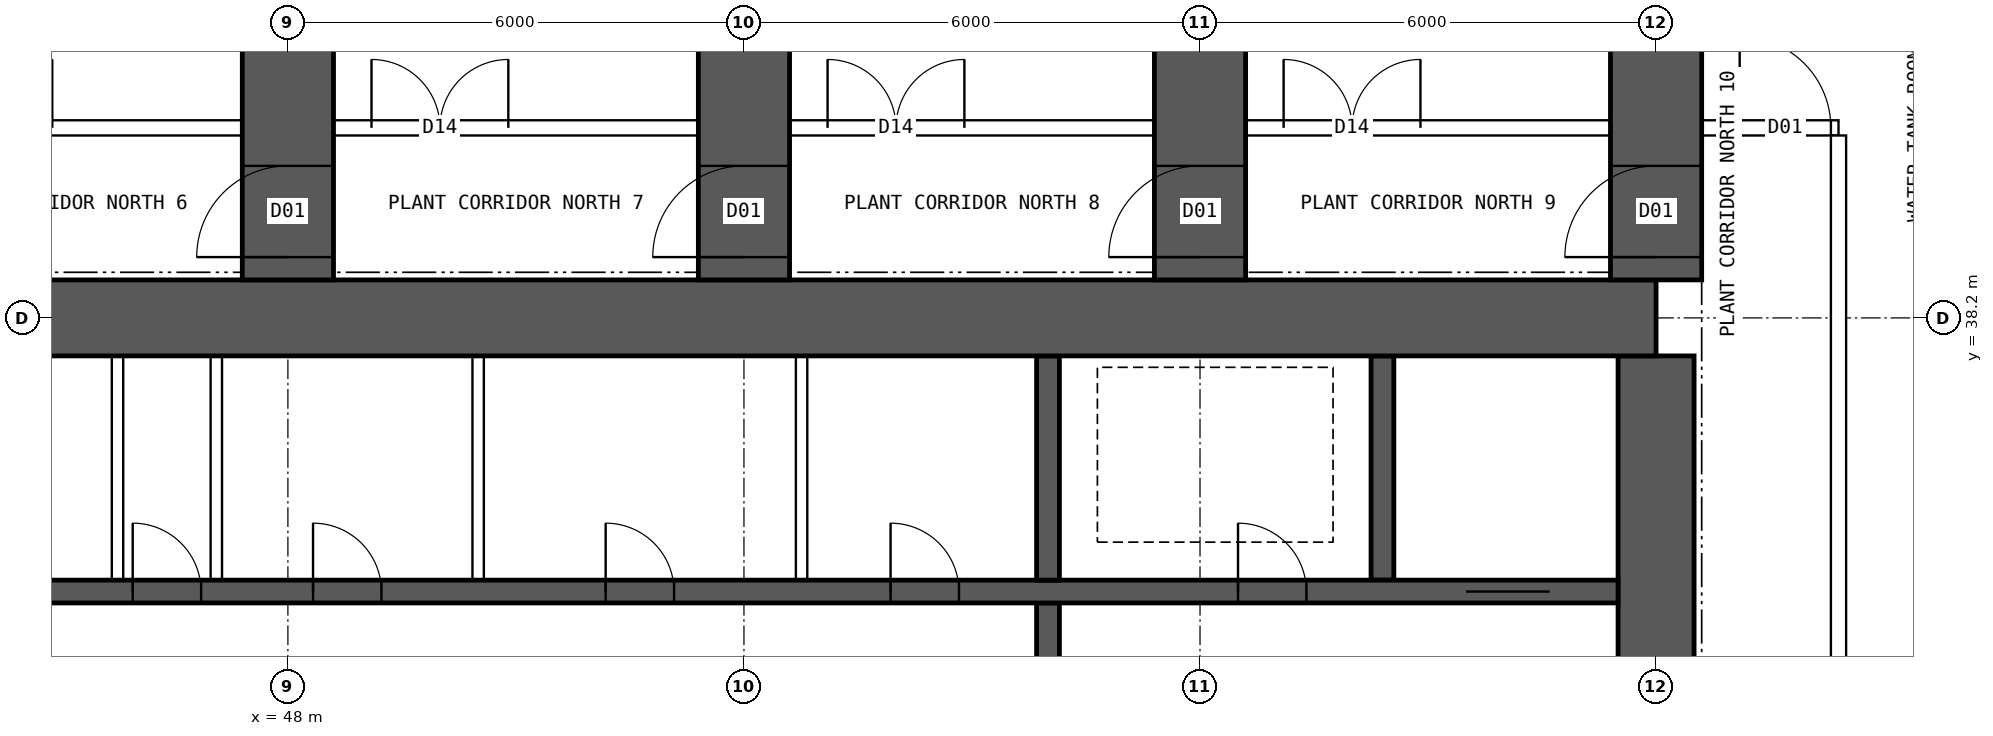
"""IFC4 building model, lengths in metres.
Left out: names, types, materials, properties, quantities, classifications, styles, units other than length and angle.
Written with IfcOpenShell. Run it as: python <this file> out.ifc"""

import sys

from ifc_helpers import new_model, si_unit, direction, frame, frame_2d, origin, place, context, subcontext, project, spatial, rectangle, extrude, element, fill, save


model = new_model("IFC4")
c1 = context("Model", 3, precision=1e-05, world=origin(), true_north=direction((0.0, 1.0)))
c2 = subcontext(c1, "Body", "Model", "MODEL_VIEW")
j1 = project(units=[si_unit("LENGTHUNIT", "METRE"), si_unit("PLANEANGLEUNIT", "RADIAN")], contexts=[c1])
p1 = place(None, origin())
s1 = spatial("IfcSite", under=j1, at=p1, CompositionType="ELEMENT")
p2 = place(p1, origin())
s2 = spatial("IfcBuilding", under=s1, at=p2, CompositionType="ELEMENT")
p3 = place(p2, frame((0.0, 0.0, 68.95)))
s3 = spatial("IfcBuildingStorey", under=s2, at=p3, CompositionType="ELEMENT", Elevation=68.95)
p4 = place(p3, frame((18.0, 38.2, 0.0), z_axis=(0.0, 0.0, 1.0), x_axis=(1.0, 0.0, 0.0)))
e1 = element("IfcWall", 1, at=p4, inside=s3, PredefinedType="SHEAR", context=c2, shape_type="SweptSolid", body=[
    extrude(rectangle(XDim=48.0, YDim=1.0, at=frame_2d((24.0, 0.0))), origin(), (0.0, 0.0, 1.0), 7.2),
])
p5 = place(p3, frame((66.0, 26.3, 0.0), z_axis=(0.0, 0.0, 1.0), x_axis=(0.0, 1.0, 0.0)))
e2 = element("IfcWall", 2, at=p5, inside=s3, PredefinedType="SHEAR", context=c2, shape_type="SweptSolid", body=[
    extrude(rectangle(XDim=11.4, YDim=1.0, at=frame_2d((5.7, 0.0))), origin(), (0.0, 0.0, 1.0), 7.2),
])
p6 = place(p5, frame((5.0, 0.0, 0.0)))
e3 = element("IfcOpeningElement", 3, at=p6, cuts=e2, PredefinedType="OPENING", context=c2, shape_type="SweptSolid", body=[
    extrude(rectangle(XDim=1.2, YDim=2.1, at=frame_2d((0.6, 1.05))), frame((0.0, 0.51, 0.0), z_axis=(0.0, -1.0, 0.0), x_axis=(1.0, 0.0, 0.0)), (0.0, 0.0, 1.0), 1.02),
])
p7 = place(p3, frame((18.5, 34.6, 0.0), z_axis=(0.0, 0.0, 1.0), x_axis=(1.0, 0.0, 0.0)))
e4 = element("IfcWall", 4, at=p7, inside=s3, PredefinedType="SHEAR", context=c2, shape_type="SweptSolid", body=[
    extrude(rectangle(XDim=47.0, YDim=0.3, at=frame_2d((23.5, 0.0))), origin(), (0.0, 0.0, 1.0), 7.2),
])
p8 = place(p7, frame((0.9, 0.0, 0.0)))
e5 = element("IfcOpeningElement", 5, at=p8, cuts=e4, PredefinedType="OPENING", context=c2, shape_type="SweptSolid", body=[
    extrude(rectangle(XDim=1.1, YDim=2.1, at=frame_2d((0.55, 1.05))), frame((0.0, 0.16, 0.0), z_axis=(0.0, -1.0, 0.0), x_axis=(1.0, 0.0, 0.0)), (0.0, 0.0, 1.0), 0.32),
])
p9 = place(p7, frame((45.0, 0.0, 0.0)))
e6 = element("IfcOpeningElement", 6, at=p9, cuts=e4, PredefinedType="OPENING", context=c2, shape_type="SweptSolid", body=[
    extrude(rectangle(XDim=1.1, YDim=2.1, at=frame_2d((0.55, 1.05))), frame((0.0, 0.16, 0.0), z_axis=(0.0, -1.0, 0.0), x_axis=(1.0, 0.0, 0.0)), (0.0, 0.0, 1.0), 0.32),
])
p10 = place(p7, frame((4.1, 0.0, 0.0)))
e7 = element("IfcOpeningElement", 7, at=p10, cuts=e4, PredefinedType="OPENING", context=c2, shape_type="SweptSolid", body=[
    extrude(rectangle(XDim=0.9, YDim=2.1, at=frame_2d((0.45, 1.05))), frame((0.0, 0.16, 0.0), z_axis=(0.0, -1.0, 0.0), x_axis=(1.0, 0.0, 0.0)), (0.0, 0.0, 1.0), 0.32),
])
p11 = place(p7, frame((42.0, 0.0, 0.0)))
e8 = element("IfcOpeningElement", 8, at=p11, cuts=e4, PredefinedType="OPENING", context=c2, shape_type="SweptSolid", body=[
    extrude(rectangle(XDim=0.9, YDim=2.1, at=frame_2d((0.45, 1.05))), frame((0.0, 0.16, 0.0), z_axis=(0.0, -1.0, 0.0), x_axis=(1.0, 0.0, 0.0)), (0.0, 0.0, 1.0), 0.32),
])
p12 = place(p7, frame((8.875, 0.0, 0.0)))
e9 = element("IfcOpeningElement", 9, at=p12, cuts=e4, PredefinedType="OPENING", context=c2, shape_type="SweptSolid", body=[
    extrude(rectangle(XDim=0.9, YDim=2.1, at=frame_2d((0.45, 1.05))), frame((0.0, 0.16, 0.0), z_axis=(0.0, -1.0, 0.0), x_axis=(1.0, 0.0, 0.0)), (0.0, 0.0, 1.0), 0.32),
])
p13 = place(p7, frame((12.849, 0.0, 0.0)))
e10 = element("IfcOpeningElement", 10, at=p13, cuts=e4, PredefinedType="OPENING", context=c2, shape_type="SweptSolid", body=[
    extrude(rectangle(XDim=0.9, YDim=2.1, at=frame_2d((0.45, 1.05))), frame((0.0, 0.16, 0.0), z_axis=(0.0, -1.0, 0.0), x_axis=(1.0, 0.0, 0.0)), (0.0, 0.0, 1.0), 0.32),
])
p14 = place(p7, frame((16.496, 0.0, 0.0)))
e11 = element("IfcOpeningElement", 11, at=p14, cuts=e4, PredefinedType="OPENING", context=c2, shape_type="SweptSolid", body=[
    extrude(rectangle(XDim=0.9, YDim=2.1, at=frame_2d((0.45, 1.05))), frame((0.0, 0.16, 0.0), z_axis=(0.0, -1.0, 0.0), x_axis=(1.0, 0.0, 0.0)), (0.0, 0.0, 1.0), 0.32),
])
p15 = place(p7, frame((20.255, 0.0, 0.0)))
e12 = element("IfcOpeningElement", 12, at=p15, cuts=e4, PredefinedType="OPENING", context=c2, shape_type="SweptSolid", body=[
    extrude(rectangle(XDim=0.9, YDim=2.1, at=frame_2d((0.45, 1.05))), frame((0.0, 0.16, 0.0), z_axis=(0.0, -1.0, 0.0), x_axis=(1.0, 0.0, 0.0)), (0.0, 0.0, 1.0), 0.32),
])
p16 = place(p7, frame((24.661, 0.0, 0.0)))
e13 = element("IfcOpeningElement", 13, at=p16, cuts=e4, PredefinedType="OPENING", context=c2, shape_type="SweptSolid", body=[
    extrude(rectangle(XDim=0.9, YDim=2.1, at=frame_2d((0.45, 1.05))), frame((0.0, 0.16, 0.0), z_axis=(0.0, -1.0, 0.0), x_axis=(1.0, 0.0, 0.0)), (0.0, 0.0, 1.0), 0.32),
])
p17 = place(p7, frame((27.458, 0.0, 0.0)))
e14 = element("IfcOpeningElement", 14, at=p17, cuts=e4, PredefinedType="OPENING", context=c2, shape_type="SweptSolid", body=[
    extrude(rectangle(XDim=0.9, YDim=2.1, at=frame_2d((0.45, 1.05))), frame((0.0, 0.16, 0.0), z_axis=(0.0, -1.0, 0.0), x_axis=(1.0, 0.0, 0.0)), (0.0, 0.0, 1.0), 0.32),
])
p18 = place(p7, frame((29.831, 0.0, 0.0)))
e15 = element("IfcOpeningElement", 15, at=p18, cuts=e4, PredefinedType="OPENING", context=c2, shape_type="SweptSolid", body=[
    extrude(rectangle(XDim=0.9, YDim=2.1, at=frame_2d((0.45, 1.05))), frame((0.0, 0.16, 0.0), z_axis=(0.0, -1.0, 0.0), x_axis=(1.0, 0.0, 0.0)), (0.0, 0.0, 1.0), 0.32),
])
p19 = place(p7, frame((33.68, 0.0, 0.0)))
e16 = element("IfcOpeningElement", 16, at=p19, cuts=e4, PredefinedType="OPENING", context=c2, shape_type="SweptSolid", body=[
    extrude(rectangle(XDim=0.9, YDim=2.1, at=frame_2d((0.45, 1.05))), frame((0.0, 0.16, 0.0), z_axis=(0.0, -1.0, 0.0), x_axis=(1.0, 0.0, 0.0)), (0.0, 0.0, 1.0), 0.32),
])
p20 = place(p7, frame((37.429, 0.0, 0.0)))
e17 = element("IfcOpeningElement", 17, at=p20, cuts=e4, PredefinedType="OPENING", context=c2, shape_type="SweptSolid", body=[
    extrude(rectangle(XDim=0.9, YDim=2.1, at=frame_2d((0.45, 1.05))), frame((0.0, 0.16, 0.0), z_axis=(0.0, -1.0, 0.0), x_axis=(1.0, 0.0, 0.0)), (0.0, 0.0, 1.0), 0.32),
])
p21 = place(p3, frame((58.0, 30.55, 0.0), z_axis=(0.0, 0.0, 1.0), x_axis=(0.0, 1.0, 0.0)))
e18 = element("IfcWall", 18, at=p21, inside=s3, PredefinedType="SHEAR", context=c2, shape_type="SweptSolid", body=[
    extrude(rectangle(XDim=3.9, YDim=0.3, at=frame_2d((1.95, 0.0))), origin(), (0.0, 0.0, 1.0), 7.2),
])
p22 = place(p21, frame((1.4, 0.0, 0.0)))
e19 = element("IfcOpeningElement", 19, at=p22, cuts=e18, PredefinedType="OPENING", context=c2, shape_type="SweptSolid", body=[
    extrude(rectangle(XDim=1.2, YDim=2.1, at=frame_2d((0.6, 1.05))), frame((0.0, 0.16, 0.0), z_axis=(0.0, -1.0, 0.0), x_axis=(1.0, 0.0, 0.0)), (0.0, 0.0, 1.0), 0.32),
])
for number, where, z_axis, x_axis in (
    (20, (62.4, 34.75, 0.0), (0.0, 0.0, 1.0), (0.0, 1.0, 0.0)),
    (21, (58.0, 34.75, 0.0), (0.0, 0.0, 1.0), (0.0, 1.0, 0.0)),
):
    element("IfcWall", number, at=place(p3, frame(where, z_axis=z_axis, x_axis=x_axis)), inside=s3, PredefinedType="SHEAR", context=c2, shape_type="SweptSolid", body=[
        extrude(rectangle(XDim=2.95, YDim=0.3, at=frame_2d((1.475, 0.0))), origin(), (0.0, 0.0, 1.0), 7.2),
    ])
p23 = place(p3, frame((48.0, 38.7, 0.0), z_axis=(0.0, 0.0, 1.0), x_axis=(0.0, 1.0, 0.0)))
e22 = element("IfcWall", 22, at=p23, inside=s3, PredefinedType="SHEAR", context=c2, shape_type="SweptSolid", body=[
    extrude(rectangle(XDim=17.6, YDim=1.2, at=frame_2d((8.8, 0.0))), origin(), (0.0, 0.0, 1.0), 7.2),
])
p24 = place(p23, frame((0.3, 0.0, 0.0)))
e23 = element("IfcOpeningElement", 23, at=p24, cuts=e22, PredefinedType="OPENING", context=c2, shape_type="SweptSolid", body=[
    extrude(rectangle(XDim=1.2, YDim=2.1, at=frame_2d((0.6, 1.05))), frame((0.0, 0.61, 0.0), z_axis=(0.0, -1.0, 0.0), x_axis=(1.0, 0.0, 0.0)), (0.0, 0.0, 1.0), 1.22),
])
p25 = place(p3, frame((54.0, 38.7, 0.0), z_axis=(0.0, 0.0, 1.0), x_axis=(0.0, 1.0, 0.0)))
e24 = element("IfcWall", 24, at=p25, inside=s3, PredefinedType="SHEAR", context=c2, shape_type="SweptSolid", body=[
    extrude(rectangle(XDim=17.6, YDim=1.2, at=frame_2d((8.8, 0.0))), origin(), (0.0, 0.0, 1.0), 7.2),
])
p26 = place(p25, frame((0.3, 0.0, 0.0)))
e25 = element("IfcOpeningElement", 25, at=p26, cuts=e24, PredefinedType="OPENING", context=c2, shape_type="SweptSolid", body=[
    extrude(rectangle(XDim=1.2, YDim=2.1, at=frame_2d((0.6, 1.05))), frame((0.0, 0.61, 0.0), z_axis=(0.0, -1.0, 0.0), x_axis=(1.0, 0.0, 0.0)), (0.0, 0.0, 1.0), 1.22),
])
p27 = place(p3, frame((60.0, 38.7, 0.0), z_axis=(0.0, 0.0, 1.0), x_axis=(0.0, 1.0, 0.0)))
e26 = element("IfcWall", 26, at=p27, inside=s3, PredefinedType="SHEAR", context=c2, shape_type="SweptSolid", body=[
    extrude(rectangle(XDim=17.6, YDim=1.2, at=frame_2d((8.8, 0.0))), origin(), (0.0, 0.0, 1.0), 7.2),
])
p28 = place(p27, frame((0.3, 0.0, 0.0)))
e27 = element("IfcOpeningElement", 27, at=p28, cuts=e26, PredefinedType="OPENING", context=c2, shape_type="SweptSolid", body=[
    extrude(rectangle(XDim=1.2, YDim=2.1, at=frame_2d((0.6, 1.05))), frame((0.0, 0.61, 0.0), z_axis=(0.0, -1.0, 0.0), x_axis=(1.0, 0.0, 0.0)), (0.0, 0.0, 1.0), 1.22),
])
p29 = place(p3, frame((66.0, 38.7, 0.0), z_axis=(0.0, 0.0, 1.0), x_axis=(0.0, 1.0, 0.0)))
e28 = element("IfcWall", 28, at=p29, inside=s3, PredefinedType="SHEAR", context=c2, shape_type="SweptSolid", body=[
    extrude(rectangle(XDim=17.6, YDim=1.2, at=frame_2d((8.8, 0.0))), origin(), (0.0, 0.0, 1.0), 7.2),
])
p30 = place(p29, frame((0.3, 0.0, 0.0)))
e29 = element("IfcOpeningElement", 29, at=p30, cuts=e28, PredefinedType="OPENING", context=c2, shape_type="SweptSolid", body=[
    extrude(rectangle(XDim=1.2, YDim=2.1, at=frame_2d((0.6, 1.05))), frame((0.0, 0.61, 0.0), z_axis=(0.0, -1.0, 0.0), x_axis=(1.0, 0.0, 0.0)), (0.0, 0.0, 1.0), 1.22),
])
for number, where, z_axis, x_axis in (
    (30, (45.758, 34.75, 0.0), (0.0, 0.0, 1.0), (0.0, 1.0, 0.0)),
    (31, (47.058, 34.75, 0.0), (0.0, 0.0, 1.0), (0.0, 1.0, 0.0)),
    (32, (50.503, 34.75, 0.0), (0.0, 0.0, 1.0), (0.0, 1.0, 0.0)),
    (33, (54.758, 34.75, 0.0), (0.0, 0.0, 1.0), (0.0, 1.0, 0.0)),
):
    element("IfcWall", number, at=place(p3, frame(where, z_axis=z_axis, x_axis=x_axis)), inside=s3, PredefinedType="SOLIDWALL", context=c2, shape_type="SweptSolid", body=[
        extrude(rectangle(XDim=2.95, YDim=0.15, at=frame_2d((1.475, 0.0))), origin(), (0.0, 0.0, 1.0), 6.9),
    ])
p31 = place(p3, frame((15.6, 40.7, 0.0), z_axis=(0.0, 0.0, 1.0), x_axis=(1.0, 0.0, 0.0)))
e34 = element("IfcWall", 34, at=p31, inside=s3, PredefinedType="SOLIDWALL", context=c2, shape_type="SweptSolid", body=[
    extrude(rectangle(XDim=52.8, YDim=0.2, at=frame_2d((26.4, 0.0))), origin(), (0.0, 0.0, 1.0), 6.9),
])
p32 = place(p31, frame((0.6, 0.0, 0.0)))
e35 = element("IfcOpeningElement", 35, at=p32, cuts=e34, PredefinedType="OPENING", context=c2, shape_type="SweptSolid", body=[
    extrude(rectangle(XDim=1.2, YDim=2.1, at=frame_2d((0.6, 1.05))), frame((0.0, 0.11, 0.0), z_axis=(0.0, -1.0, 0.0), x_axis=(1.0, 0.0, 0.0)), (0.0, 0.0, 1.0), 0.22),
])
p33 = place(p31, frame((3.5, 0.0, 0.0)))
e36 = element("IfcOpeningElement", 36, at=p33, cuts=e34, PredefinedType="OPENING", context=c2, shape_type="SweptSolid", body=[
    extrude(rectangle(XDim=1.8, YDim=2.4, at=frame_2d((0.9, 1.2))), frame((0.0, 0.11, 0.0), z_axis=(0.0, -1.0, 0.0), x_axis=(1.0, 0.0, 0.0)), (0.0, 0.0, 1.0), 0.22),
])
p34 = place(p31, frame((9.5, 0.0, 0.0)))
e37 = element("IfcOpeningElement", 37, at=p34, cuts=e34, PredefinedType="OPENING", context=c2, shape_type="SweptSolid", body=[
    extrude(rectangle(XDim=1.8, YDim=2.4, at=frame_2d((0.9, 1.2))), frame((0.0, 0.11, 0.0), z_axis=(0.0, -1.0, 0.0), x_axis=(1.0, 0.0, 0.0)), (0.0, 0.0, 1.0), 0.22),
])
p35 = place(p31, frame((15.5, 0.0, 0.0)))
e38 = element("IfcOpeningElement", 38, at=p35, cuts=e34, PredefinedType="OPENING", context=c2, shape_type="SweptSolid", body=[
    extrude(rectangle(XDim=1.8, YDim=2.4, at=frame_2d((0.9, 1.2))), frame((0.0, 0.11, 0.0), z_axis=(0.0, -1.0, 0.0), x_axis=(1.0, 0.0, 0.0)), (0.0, 0.0, 1.0), 0.22),
])
p36 = place(p31, frame((21.5, 0.0, 0.0)))
e39 = element("IfcOpeningElement", 39, at=p36, cuts=e34, PredefinedType="OPENING", context=c2, shape_type="SweptSolid", body=[
    extrude(rectangle(XDim=1.8, YDim=2.4, at=frame_2d((0.9, 1.2))), frame((0.0, 0.11, 0.0), z_axis=(0.0, -1.0, 0.0), x_axis=(1.0, 0.0, 0.0)), (0.0, 0.0, 1.0), 0.22),
])
p37 = place(p31, frame((27.5, 0.0, 0.0)))
e40 = element("IfcOpeningElement", 40, at=p37, cuts=e34, PredefinedType="OPENING", context=c2, shape_type="SweptSolid", body=[
    extrude(rectangle(XDim=1.8, YDim=2.4, at=frame_2d((0.9, 1.2))), frame((0.0, 0.11, 0.0), z_axis=(0.0, -1.0, 0.0), x_axis=(1.0, 0.0, 0.0)), (0.0, 0.0, 1.0), 0.22),
])
p38 = place(p31, frame((33.5, 0.0, 0.0)))
e41 = element("IfcOpeningElement", 41, at=p38, cuts=e34, PredefinedType="OPENING", context=c2, shape_type="SweptSolid", body=[
    extrude(rectangle(XDim=1.8, YDim=2.4, at=frame_2d((0.9, 1.2))), frame((0.0, 0.11, 0.0), z_axis=(0.0, -1.0, 0.0), x_axis=(1.0, 0.0, 0.0)), (0.0, 0.0, 1.0), 0.22),
])
p39 = place(p31, frame((39.5, 0.0, 0.0)))
e42 = element("IfcOpeningElement", 42, at=p39, cuts=e34, PredefinedType="OPENING", context=c2, shape_type="SweptSolid", body=[
    extrude(rectangle(XDim=1.8, YDim=2.4, at=frame_2d((0.9, 1.2))), frame((0.0, 0.11, 0.0), z_axis=(0.0, -1.0, 0.0), x_axis=(1.0, 0.0, 0.0)), (0.0, 0.0, 1.0), 0.22),
])
p40 = place(p31, frame((45.5, 0.0, 0.0)))
e43 = element("IfcOpeningElement", 43, at=p40, cuts=e34, PredefinedType="OPENING", context=c2, shape_type="SweptSolid", body=[
    extrude(rectangle(XDim=1.8, YDim=2.4, at=frame_2d((0.9, 1.2))), frame((0.0, 0.11, 0.0), z_axis=(0.0, -1.0, 0.0), x_axis=(1.0, 0.0, 0.0)), (0.0, 0.0, 1.0), 0.22),
])
p41 = place(p31, frame((51.5, 0.0, 0.0)))
e44 = element("IfcOpeningElement", 44, at=p41, cuts=e34, PredefinedType="OPENING", context=c2, shape_type="SweptSolid", body=[
    extrude(rectangle(XDim=1.2, YDim=2.1, at=frame_2d((0.6, 1.05))), frame((0.0, 0.11, 0.0), z_axis=(0.0, -1.0, 0.0), x_axis=(1.0, 0.0, 0.0)), (0.0, 0.0, 1.0), 0.22),
])
p42 = place(p3, frame((68.4, 23.4, 0.0), z_axis=(0.0, 0.0, 1.0), x_axis=(0.0, 1.0, 0.0)))
e45 = element("IfcWall", 45, at=p42, inside=s3, PredefinedType="SOLIDWALL", context=c2, shape_type="SweptSolid", body=[
    extrude(rectangle(XDim=17.2, YDim=0.2, at=frame_2d((8.6, 0.0))), origin(), (0.0, 0.0, 1.0), 6.9),
])
p43 = place(p9, origin())
e46 = element("IfcDoor", 46, at=p43, inside=s3, OperationType="DOUBLE_DOOR_SLIDING", PredefinedType="DOOR", context=c2, shape_type="SweptSolid", body=[
    extrude(rectangle(XDim=1.1, YDim=2.1, at=frame_2d((0.55, 1.05))), frame((0.0, 0.025, 0.0), z_axis=(0.0, -1.0, 0.0), x_axis=(1.0, 0.0, 0.0)), (0.0, 0.0, 1.0), 0.05),
])
fill(e6, e46)
p44 = place(p11, origin())
e47 = element("IfcDoor", 47, at=p44, inside=s3, OperationType="SINGLE_SWING_LEFT", PredefinedType="DOOR", context=c2, shape_type="SweptSolid", body=[
    extrude(rectangle(XDim=0.9, YDim=2.1, at=frame_2d((0.45, 1.05))), frame((0.0, 0.025, 0.0), z_axis=(0.0, -1.0, 0.0), x_axis=(1.0, 0.0, 0.0)), (0.0, 0.0, 1.0), 0.05),
])
fill(e8, e47)
p45 = place(p17, origin())
e48 = element("IfcDoor", 48, at=p45, inside=s3, OperationType="SINGLE_SWING_LEFT", PredefinedType="DOOR", context=c2, shape_type="SweptSolid", body=[
    extrude(rectangle(XDim=0.9, YDim=2.1, at=frame_2d((0.45, 1.05))), frame((0.0, 0.025, 0.0), z_axis=(0.0, -1.0, 0.0), x_axis=(1.0, 0.0, 0.0)), (0.0, 0.0, 1.0), 0.05),
])
fill(e14, e48)
p46 = place(p18, origin())
e49 = element("IfcDoor", 49, at=p46, inside=s3, OperationType="SINGLE_SWING_LEFT", PredefinedType="DOOR", context=c2, shape_type="SweptSolid", body=[
    extrude(rectangle(XDim=0.9, YDim=2.1, at=frame_2d((0.45, 1.05))), frame((0.0, 0.025, 0.0), z_axis=(0.0, -1.0, 0.0), x_axis=(1.0, 0.0, 0.0)), (0.0, 0.0, 1.0), 0.05),
])
fill(e15, e49)
p47 = place(p19, origin())
e50 = element("IfcDoor", 50, at=p47, inside=s3, OperationType="SINGLE_SWING_LEFT", PredefinedType="DOOR", context=c2, shape_type="SweptSolid", body=[
    extrude(rectangle(XDim=0.9, YDim=2.1, at=frame_2d((0.45, 1.05))), frame((0.0, 0.025, 0.0), z_axis=(0.0, -1.0, 0.0), x_axis=(1.0, 0.0, 0.0)), (0.0, 0.0, 1.0), 0.05),
])
fill(e16, e50)
p48 = place(p20, origin())
e51 = element("IfcDoor", 51, at=p48, inside=s3, OperationType="SINGLE_SWING_LEFT", PredefinedType="DOOR", context=c2, shape_type="SweptSolid", body=[
    extrude(rectangle(XDim=0.9, YDim=2.1, at=frame_2d((0.45, 1.05))), frame((0.0, 0.025, 0.0), z_axis=(0.0, -1.0, 0.0), x_axis=(1.0, 0.0, 0.0)), (0.0, 0.0, 1.0), 0.05),
])
fill(e17, e51)
p49 = place(p38, origin())
e52 = element("IfcDoor", 52, at=p49, inside=s3, OperationType="DOUBLE_DOOR_SINGLE_SWING", PredefinedType="DOOR", context=c2, shape_type="SweptSolid", body=[
    extrude(rectangle(XDim=1.8, YDim=2.4, at=frame_2d((0.9, 1.2))), frame((0.0, 0.025, 0.0), z_axis=(0.0, -1.0, 0.0), x_axis=(1.0, 0.0, 0.0)), (0.0, 0.0, 1.0), 0.05),
])
fill(e41, e52)
p50 = place(p39, origin())
e53 = element("IfcDoor", 53, at=p50, inside=s3, OperationType="DOUBLE_DOOR_SINGLE_SWING", PredefinedType="DOOR", context=c2, shape_type="SweptSolid", body=[
    extrude(rectangle(XDim=1.8, YDim=2.4, at=frame_2d((0.9, 1.2))), frame((0.0, 0.025, 0.0), z_axis=(0.0, -1.0, 0.0), x_axis=(1.0, 0.0, 0.0)), (0.0, 0.0, 1.0), 0.05),
])
fill(e42, e53)
p51 = place(p40, origin())
e54 = element("IfcDoor", 54, at=p51, inside=s3, OperationType="DOUBLE_DOOR_SINGLE_SWING", PredefinedType="DOOR", context=c2, shape_type="SweptSolid", body=[
    extrude(rectangle(XDim=1.8, YDim=2.4, at=frame_2d((0.9, 1.2))), frame((0.0, 0.025, 0.0), z_axis=(0.0, -1.0, 0.0), x_axis=(1.0, 0.0, 0.0)), (0.0, 0.0, 1.0), 0.05),
])
fill(e43, e54)
p52 = place(p41, origin())
e55 = element("IfcDoor", 55, at=p52, inside=s3, OperationType="SINGLE_SWING_LEFT", PredefinedType="DOOR", context=c2, shape_type="SweptSolid", body=[
    extrude(rectangle(XDim=1.2, YDim=2.1, at=frame_2d((0.6, 1.05))), frame((0.0, 0.025, 0.0), z_axis=(0.0, -1.0, 0.0), x_axis=(1.0, 0.0, 0.0)), (0.0, 0.0, 1.0), 0.05),
])
fill(e44, e55)
p53 = place(p24, origin())
e56 = element("IfcDoor", 56, at=p53, inside=s3, OperationType="SINGLE_SWING_LEFT", PredefinedType="DOOR", context=c2, shape_type="SweptSolid", body=[
    extrude(rectangle(XDim=1.2, YDim=2.1, at=frame_2d((0.6, 1.05))), frame((0.0, 0.025, 0.0), z_axis=(0.0, -1.0, 0.0), x_axis=(1.0, 0.0, 0.0)), (0.0, 0.0, 1.0), 0.05),
])
fill(e23, e56)
p54 = place(p26, origin())
e57 = element("IfcDoor", 57, at=p54, inside=s3, OperationType="SINGLE_SWING_LEFT", PredefinedType="DOOR", context=c2, shape_type="SweptSolid", body=[
    extrude(rectangle(XDim=1.2, YDim=2.1, at=frame_2d((0.6, 1.05))), frame((0.0, 0.025, 0.0), z_axis=(0.0, -1.0, 0.0), x_axis=(1.0, 0.0, 0.0)), (0.0, 0.0, 1.0), 0.05),
])
fill(e25, e57)
p55 = place(p28, origin())
e58 = element("IfcDoor", 58, at=p55, inside=s3, OperationType="SINGLE_SWING_LEFT", PredefinedType="DOOR", context=c2, shape_type="SweptSolid", body=[
    extrude(rectangle(XDim=1.2, YDim=2.1, at=frame_2d((0.6, 1.05))), frame((0.0, 0.025, 0.0), z_axis=(0.0, -1.0, 0.0), x_axis=(1.0, 0.0, 0.0)), (0.0, 0.0, 1.0), 0.05),
])
fill(e27, e58)
p56 = place(p30, origin())
e59 = element("IfcDoor", 59, at=p56, inside=s3, OperationType="SINGLE_SWING_LEFT", PredefinedType="DOOR", context=c2, shape_type="SweptSolid", body=[
    extrude(rectangle(XDim=1.2, YDim=2.1, at=frame_2d((0.6, 1.05))), frame((0.0, 0.025, 0.0), z_axis=(0.0, -1.0, 0.0), x_axis=(1.0, 0.0, 0.0)), (0.0, 0.0, 1.0), 0.05),
])
fill(e29, e59)
save(model, sys.argv[1])
